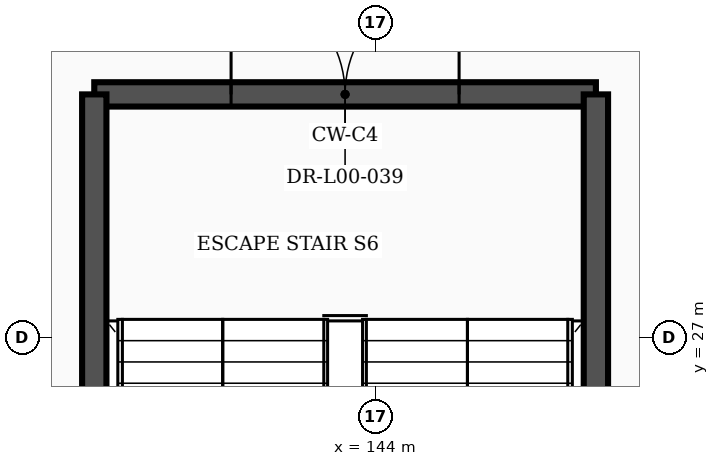
"""IFC4 building model, lengths in metres.
Left out: names, types, materials, properties, quantities, classifications, styles, units other than length and angle.
Written with IfcOpenShell. Run it as: python <this file> out.ifc"""

import sys

from ifc_helpers import new_model, si_unit, direction, frame, frame_2d, origin, place, context, subcontext, project, spatial, rectangle, extrude, element, fill, save


model = new_model("IFC4")
c1 = context("Model", 3, precision=1e-05, world=origin(), true_north=direction((0.0, 1.0)))
c2 = subcontext(c1, "Body", "Model", "MODEL_VIEW")
j1 = project(units=[si_unit("LENGTHUNIT", "METRE"), si_unit("PLANEANGLEUNIT", "RADIAN")], contexts=[c1])
p1 = place(None, origin())
s1 = spatial("IfcSite", under=j1, at=p1, CompositionType="ELEMENT")
p2 = place(p1, origin())
s2 = spatial("IfcBuilding", under=s1, at=p2, CompositionType="ELEMENT")
p3 = place(p2, origin())
s3 = spatial("IfcBuildingStorey", under=s2, at=p3, CompositionType="ELEMENT", Elevation=0.0)
p4 = place(p3, frame((140.3, 30.2, 0.0), z_axis=(0.0, 0.0, 1.0), x_axis=(1.0, 0.0, 0.0)))
e1 = element("IfcWall", 1, at=p4, inside=s3, PredefinedType="SHEAR", context=c2, shape_type="SweptSolid", body=[
    extrude(rectangle(XDim=6.6, YDim=0.32, at=frame_2d((3.3, 0.0))), origin(), (0.0, 0.0, 1.0), 5.75),
])
p5 = place(p4, frame((1.8, 0.0, 0.0)))
e2 = element("IfcOpeningElement", 2, at=p5, cuts=e1, PredefinedType="OPENING", context=c2, shape_type="SweptSolid", body=[
    extrude(rectangle(XDim=3.0, YDim=2.25, at=frame_2d((1.5, 1.125))), frame((0.0, 0.172, 0.0), z_axis=(0.0, -1.0, 0.0), x_axis=(1.0, 0.0, 0.0)), (0.0, 0.0, 1.0), 0.344),
])
for number, where, z_axis, x_axis in (
    (3, (140.3, 19.2, 0.0), (0.0, 0.0, 1.0), (0.0, 1.0, 0.0)),
    (4, (146.9, 19.2, 0.0), (0.0, 0.0, 1.0), (0.0, 1.0, 0.0)),
):
    element("IfcWall", number, at=place(p3, frame(where, z_axis=z_axis, x_axis=x_axis)), inside=s3, PredefinedType="SHEAR", context=c2, shape_type="SweptSolid", body=[
        extrude(rectangle(XDim=11.0, YDim=0.32, at=frame_2d((5.5, 0.0))), origin(), (0.0, 0.0, 1.0), 5.75),
    ])
p6 = place(p5, origin())
e5 = element("IfcDoor", 5, at=p6, inside=s3, OperationType="DOUBLE_DOOR_SINGLE_SWING", PredefinedType="DOOR", context=c2, shape_type="SweptSolid", body=[
    extrude(rectangle(XDim=3.0, YDim=2.25, at=frame_2d((1.5, 1.125))), frame((0.0, 0.025, 0.0), z_axis=(0.0, -1.0, 0.0), x_axis=(1.0, 0.0, 0.0)), (0.0, 0.0, 1.0), 0.05),
])
fill(e2, e5)
save(model, sys.argv[1])
